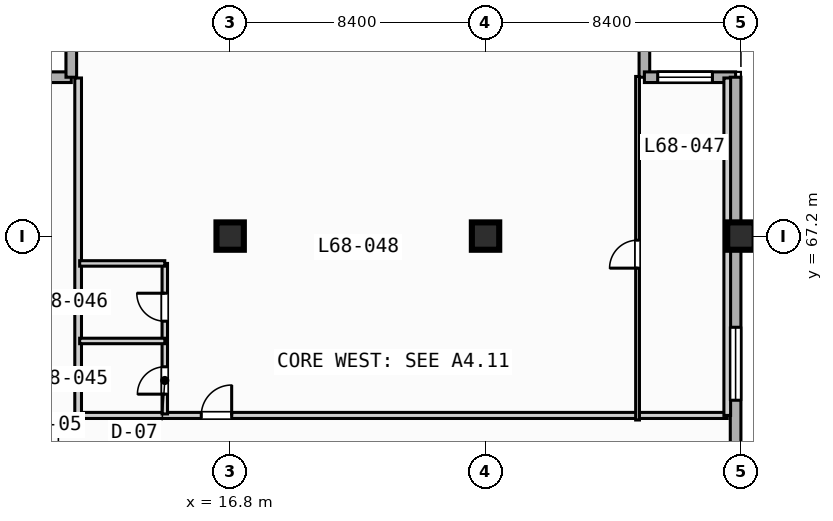
"""IFC4 building model, lengths in metres.
Left out: names, types, materials, properties, quantities, classifications, styles, units other than length and angle.
Written with IfcOpenShell. Run it as: python <this file> out.ifc"""

import sys

from ifc_helpers import new_model, si_unit, direction, frame, frame_2d, origin, origin_2d, place, context, subcontext, project, spatial, rectangle, extrude, element, fill, save


model = new_model("IFC4")
c1 = context("Model", 3, precision=1e-05, world=origin(), true_north=direction((0.0, 1.0)))
c2 = subcontext(c1, "Body", "Model", "MODEL_VIEW")
j1 = project(units=[si_unit("LENGTHUNIT", "METRE"), si_unit("PLANEANGLEUNIT", "RADIAN")], contexts=[c1])
p1 = place(None, origin())
s1 = spatial("IfcSite", under=j1, at=p1, CompositionType="ELEMENT")
p2 = place(p1, origin())
s2 = spatial("IfcBuilding", under=s1, at=p2, CompositionType="ELEMENT")
p3 = place(p2, frame((0.0, 0.0, 274.9)))
s3 = spatial("IfcBuildingStorey", under=s2, at=p3, CompositionType="ELEMENT", Elevation=274.9)
for number, where, z_axis, x_axis in (
    (1, (16.8, 67.2, 0.0), (0.0, 0.0, 1.0), (1.0, 0.0, 0.0)),
    (2, (25.2, 67.2, 0.0), (0.0, 0.0, 1.0), (1.0, 0.0, 0.0)),
    (3, (33.6, 67.2, 0.0), (0.0, 0.0, 1.0), (1.0, 0.0, 0.0)),
):
    element("IfcColumn", number, at=place(p3, frame(where, z_axis=z_axis, x_axis=x_axis)), inside=s3, PredefinedType="COLUMN", context=c2, shape_type="SweptSolid", body=[
        extrude(rectangle(XDim=0.9, YDim=0.9, at=origin_2d()), origin(), (0.0, 0.0, 1.0), 3.7),
    ])
for number, where, z_axis, x_axis in (
    (4, (8.575, 72.425, 0.0), (0.0, 0.0, 1.0), (1.0, 0.0, 0.0)),
    (5, (11.575, 72.425, 0.0), (0.0, 0.0, 1.0), (0.0, 1.0, 0.0)),
    (6, (30.425, 75.425, 0.0), (0.0, 0.0, 1.0), (0.0, -1.0, 0.0)),
):
    element("IfcWall", number, at=place(p3, frame(where, z_axis=z_axis, x_axis=x_axis)), inside=s3, PredefinedType="STANDARD", context=c2, shape_type="SweptSolid", body=[
        extrude(rectangle(XDim=3.0, YDim=0.35, at=frame_2d((1.5, 0.0))), origin(), (0.0, 0.0, 1.0), 3.47),
    ])
p4 = place(p3, frame((30.425, 72.425, 0.0), z_axis=(0.0, 0.0, 1.0), x_axis=(1.0, 0.0, 0.0)))
e7 = element("IfcWall", 7, at=p4, inside=s3, PredefinedType="STANDARD", context=c2, shape_type="SweptSolid", body=[
    extrude(rectangle(XDim=3.0, YDim=0.35, at=frame_2d((1.5, 0.0))), origin(), (0.0, 0.0, 1.0), 3.47),
])
p5 = place(p4, frame((0.438, 0.0, 0.85)))
e8 = element("IfcOpeningElement", 8, at=p5, cuts=e7, PredefinedType="OPENING", context=c2, shape_type="SweptSolid", body=[
    extrude(rectangle(XDim=1.8, YDim=1.8, at=frame_2d((0.9, 0.9))), frame((0.0, 0.185, 0.0), z_axis=(0.0, -1.0, 0.0), x_axis=(1.0, 0.0, 0.0)), (0.0, 0.0, 1.0), 0.37),
])
p6 = place(p3, frame((33.425, 72.425, 0.0), z_axis=(0.0, 0.0, 1.0), x_axis=(0.0, -1.0, 0.0)))
e9 = element("IfcWall", 9, at=p6, inside=s3, PredefinedType="STANDARD", context=c2, shape_type="SweptSolid", body=[
    extrude(rectangle(XDim=39.0, YDim=0.35, at=frame_2d((19.5, 0.0))), origin(), (0.0, 0.0, 1.0), 3.47),
])
p7 = place(p6, frame((33.725, 0.0, 0.85)))
e10 = element("IfcOpeningElement", 10, at=p7, cuts=e9, PredefinedType="OPENING", context=c2, shape_type="SweptSolid", body=[
    extrude(rectangle(XDim=1.8, YDim=1.8, at=frame_2d((0.9, 0.9))), frame((0.0, 0.185, 0.0), z_axis=(0.0, -1.0, 0.0), x_axis=(1.0, 0.0, 0.0)), (0.0, 0.0, 1.0), 0.37),
])
p8 = place(p6, frame((8.225, 0.0, 0.85)))
e11 = element("IfcOpeningElement", 11, at=p8, cuts=e9, PredefinedType="OPENING", context=c2, shape_type="SweptSolid", body=[
    extrude(rectangle(XDim=2.4, YDim=1.95, at=frame_2d((1.2, 0.975))), frame((0.0, 0.185, 0.0), z_axis=(0.0, -1.0, 0.0), x_axis=(1.0, 0.0, 0.0)), (0.0, 0.0, 1.0), 0.37),
])
p9 = place(p3, frame((11.8, 61.3, 0.0), z_axis=(0.0, 0.0, 1.0), x_axis=(1.0, 0.0, 0.0)))
e12 = element("IfcWall", 12, at=p9, inside=s3, PredefinedType="PARTITIONING", context=c2, shape_type="SweptSolid", body=[
    extrude(rectangle(XDim=21.35, YDim=0.2, at=frame_2d((10.675, 0.0))), origin(), (0.0, 0.0, 1.0), 3.47),
])
p10 = place(p9, frame((4.05, 0.0, 0.0)))
e13 = element("IfcOpeningElement", 13, at=p10, cuts=e12, PredefinedType="OPENING", context=c2, shape_type="SweptSolid", body=[
    extrude(rectangle(XDim=1.0, YDim=2.15, at=frame_2d((0.5, 1.075))), frame((0.0, 0.11, 0.0), z_axis=(0.0, -1.0, 0.0), x_axis=(1.0, 0.0, 0.0)), (0.0, 0.0, 1.0), 0.22),
])
for number, where, z_axis, x_axis in (
    (14, (33.15, 61.3, 0.0), (0.0, 0.0, 1.0), (0.0, 1.0, 0.0)),
    (15, (11.8, 61.3, 0.0), (0.0, 0.0, 1.0), (0.0, 1.0, 0.0)),
):
    element("IfcWall", number, at=place(p3, frame(where, z_axis=z_axis, x_axis=x_axis)), inside=s3, PredefinedType="PARTITIONING", context=c2, shape_type="SweptSolid", body=[
        extrude(rectangle(XDim=11.1, YDim=0.22, at=frame_2d((5.55, 0.0))), origin(), (0.0, 0.0, 1.0), 3.47),
    ])
p11 = place(p3, frame((14.65, 61.35, 0.0), z_axis=(0.0, 0.0, 1.0), x_axis=(0.0, 1.0, 0.0)))
e16 = element("IfcWall", 16, at=p11, inside=s3, PredefinedType="PLUMBINGWALL", context=c2, shape_type="SweptSolid", body=[
    extrude(rectangle(XDim=4.95, YDim=0.18, at=frame_2d((2.475, 0.0))), origin(), (0.0, 0.0, 1.0), 3.47),
])
p12 = place(p11, frame((0.65, 0.0, 0.0)))
e17 = element("IfcOpeningElement", 17, at=p12, cuts=e16, PredefinedType="OPENING", context=c2, shape_type="SweptSolid", body=[
    extrude(rectangle(XDim=0.9, YDim=2.1, at=frame_2d((0.45, 1.05))), frame((0.0, 0.1, 0.0), z_axis=(0.0, -1.0, 0.0), x_axis=(1.0, 0.0, 0.0)), (0.0, 0.0, 1.0), 0.2),
])
p13 = place(p11, frame((3.05, 0.0, 0.0)))
e18 = element("IfcOpeningElement", 18, at=p13, cuts=e16, PredefinedType="OPENING", context=c2, shape_type="SweptSolid", body=[
    extrude(rectangle(XDim=0.92, YDim=2.1, at=frame_2d((0.46, 1.05))), frame((0.0, 0.1, 0.0), z_axis=(0.0, -1.0, 0.0), x_axis=(1.0, 0.0, 0.0)), (0.0, 0.0, 1.0), 0.2),
])
for number, where, z_axis, x_axis in (
    (19, (11.85, 63.75, 0.0), (0.0, 0.0, 1.0), (1.0, 0.0, 0.0)),
    (20, (11.85, 66.3, 0.0), (0.0, 0.0, 1.0), (1.0, 0.0, 0.0)),
):
    element("IfcWall", number, at=place(p3, frame(where, z_axis=z_axis, x_axis=x_axis)), inside=s3, PredefinedType="PLUMBINGWALL", context=c2, shape_type="SweptSolid", body=[
        extrude(rectangle(XDim=2.8, YDim=0.18, at=frame_2d((1.4, 0.0))), origin(), (0.0, 0.0, 1.0), 3.47),
    ])
p14 = place(p3, frame((30.2, 61.15, 0.0), z_axis=(0.0, 0.0, 1.0), x_axis=(0.0, 1.0, 0.0)))
e21 = element("IfcWall", 21, at=p14, inside=s3, PredefinedType="PARTITIONING", context=c2, shape_type="SweptSolid", body=[
    extrude(rectangle(XDim=11.3, YDim=0.125, at=frame_2d((5.65, 0.0))), origin(), (0.0, 0.0, 1.0), 3.47),
])
p15 = place(p14, frame((4.995, 0.0, 0.0)))
e22 = element("IfcOpeningElement", 22, at=p15, cuts=e21, PredefinedType="OPENING", context=c2, shape_type="SweptSolid", body=[
    extrude(rectangle(XDim=0.92, YDim=2.1, at=frame_2d((0.46, 1.05))), frame((0.0, 0.073, 0.0), z_axis=(0.0, -1.0, 0.0), x_axis=(1.0, 0.0, 0.0)), (0.0, 0.0, 1.0), 0.145),
])
p16 = place(p5, origin())
e23 = element("IfcWindow", 23, at=p16, inside=s3, PartitioningType="SINGLE_PANEL", PredefinedType="WINDOW", context=c2, shape_type="SweptSolid", body=[
    extrude(rectangle(XDim=1.8, YDim=1.8, at=frame_2d((0.9, 0.9))), frame((0.0, 0.03, 0.0), z_axis=(0.0, -1.0, 0.0), x_axis=(1.0, 0.0, 0.0)), (0.0, 0.0, 1.0), 0.06),
])
fill(e8, e23)
p17 = place(p8, origin())
e24 = element("IfcWindow", 24, at=p17, inside=s3, PartitioningType="SINGLE_PANEL", PredefinedType="WINDOW", context=c2, shape_type="SweptSolid", body=[
    extrude(rectangle(XDim=2.4, YDim=1.95, at=frame_2d((1.2, 0.975))), frame((0.0, 0.03, 0.0), z_axis=(0.0, -1.0, 0.0), x_axis=(1.0, 0.0, 0.0)), (0.0, 0.0, 1.0), 0.06),
])
fill(e11, e24)
p18 = place(p10, origin())
e25 = element("IfcDoor", 25, at=p18, inside=s3, OperationType="SINGLE_SWING_RIGHT", PredefinedType="DOOR", context=c2, shape_type="SweptSolid", body=[
    extrude(rectangle(XDim=1.0, YDim=2.15, at=frame_2d((0.5, 1.075))), frame((0.0, 0.025, 0.0), z_axis=(0.0, -1.0, 0.0), x_axis=(1.0, 0.0, 0.0)), (0.0, 0.0, 1.0), 0.05),
])
fill(e13, e25)
p19 = place(p12, origin())
e26 = element("IfcDoor", 26, at=p19, inside=s3, OperationType="SINGLE_SWING_LEFT", PredefinedType="DOOR", context=c2, shape_type="SweptSolid", body=[
    extrude(rectangle(XDim=0.9, YDim=2.1, at=frame_2d((0.45, 1.05))), frame((0.0, 0.025, 0.0), z_axis=(0.0, -1.0, 0.0), x_axis=(1.0, 0.0, 0.0)), (0.0, 0.0, 1.0), 0.05),
])
fill(e17, e26)
p20 = place(p13, origin())
e27 = element("IfcDoor", 27, at=p20, inside=s3, OperationType="SINGLE_SWING_RIGHT", PredefinedType="DOOR", context=c2, shape_type="SweptSolid", body=[
    extrude(rectangle(XDim=0.92, YDim=2.1, at=frame_2d((0.46, 1.05))), frame((0.0, 0.025, 0.0), z_axis=(0.0, -1.0, 0.0), x_axis=(1.0, 0.0, 0.0)), (0.0, 0.0, 1.0), 0.05),
])
fill(e18, e27)
p21 = place(p15, origin())
e28 = element("IfcDoor", 28, at=p21, inside=s3, OperationType="SINGLE_SWING_LEFT", PredefinedType="DOOR", context=c2, shape_type="SweptSolid", body=[
    extrude(rectangle(XDim=0.92, YDim=2.1, at=frame_2d((0.46, 1.05))), frame((0.0, 0.025, 0.0), z_axis=(0.0, -1.0, 0.0), x_axis=(1.0, 0.0, 0.0)), (0.0, 0.0, 1.0), 0.05),
])
fill(e22, e28)
save(model, sys.argv[1])
